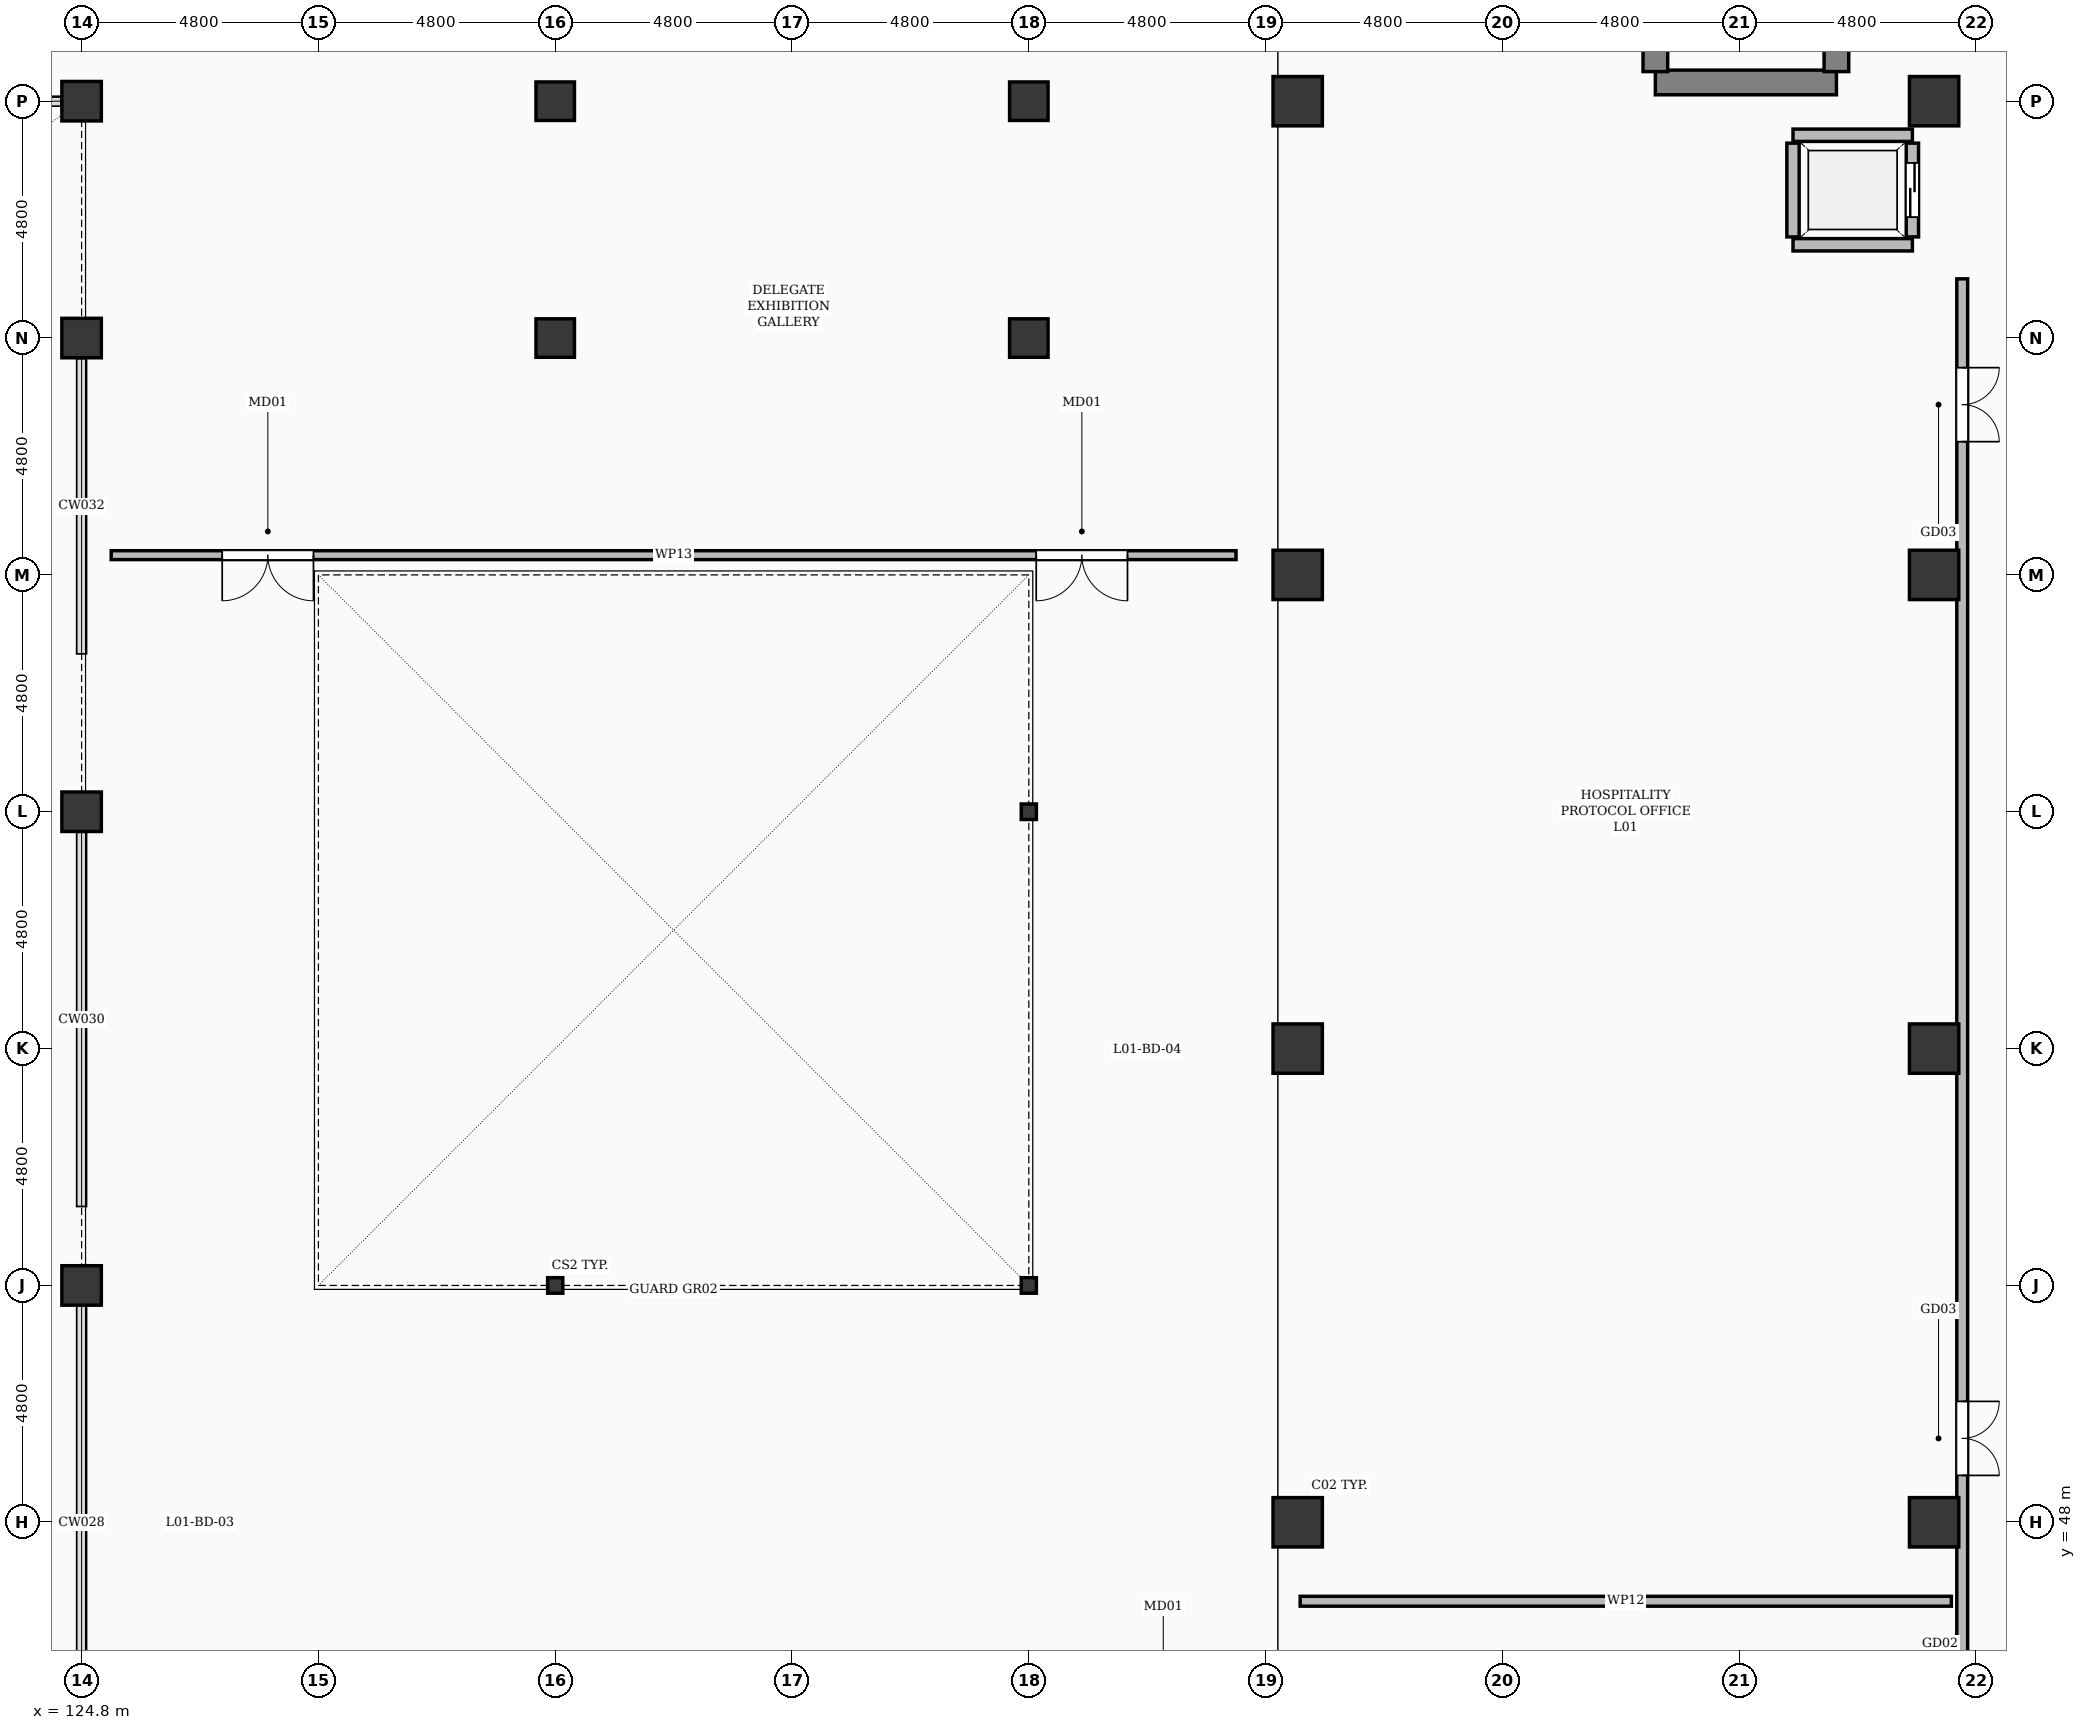
"""IFC4 building model, lengths in metres.
Left out: names, types, materials, properties, quantities, classifications, styles, units other than length and angle.
Written with IfcOpenShell. Run it as: python <this file> out.ifc"""

import sys

from ifc_helpers import new_model, si_unit, direction, frame, frame_2d, origin, origin_2d, place, context, subcontext, project, spatial, rectangle, circle, i_section, extrude, element, fill, save


model = new_model("IFC4")
c1 = context("Model", 3, precision=1e-05, world=origin(), true_north=direction((0.0, 1.0)))
c2 = subcontext(c1, "Body", "Model", "MODEL_VIEW")
j1 = project(units=[si_unit("LENGTHUNIT", "METRE"), si_unit("PLANEANGLEUNIT", "RADIAN")], contexts=[c1])
p1 = place(None, origin())
s1 = spatial("IfcSite", under=j1, at=p1, CompositionType="ELEMENT")
p2 = place(p1, origin())
s2 = spatial("IfcBuilding", under=s1, at=p2, CompositionType="ELEMENT")
p3 = place(p2, frame((0.0, 0.0, 6.0)))
s3 = spatial("IfcBuildingStorey", under=s2, at=p3, CompositionType="ELEMENT", Elevation=6.0)
for number, where, z_axis, x_axis in (
    (1, (124.8, 52.8, 0.0), (0.0, 0.0, 1.0), (1.0, 0.0, 0.0)),
    (2, (124.8, 62.4, 0.0), (0.0, 0.0, 1.0), (1.0, 0.0, 0.0)),
    (3, (124.8, 72.0, 0.0), (0.0, 0.0, 1.0), (1.0, 0.0, 0.0)),
    (4, (124.8, 76.8, 0.0), (0.0, 0.0, 1.0), (1.0, 0.0, 0.0)),
):
    element("IfcColumn", number, at=place(p3, frame(where, z_axis=z_axis, x_axis=x_axis)), inside=s3, PredefinedType="COLUMN", context=c2, shape_type="SweptSolid", body=[
        extrude(circle(Radius=0.4, at=origin_2d()), origin(), (0.0, 0.0, 1.0), 5.4),
    ])
p4 = place(p3, frame((134.4, 52.8, 0.0), z_axis=(0.0, 0.0, 1.0), x_axis=(1.0, 0.0, 0.0)))
e5 = element("IfcColumn", 5, at=p4, inside=s3, PredefinedType="COLUMN", context=c2, shape_type="SweptSolid", body=[
    extrude(i_section(OverallWidth=0.307, OverallDepth=0.314, WebThickness=0.012, FlangeThickness=0.019, FilletRadius=0.015, at=origin_2d()), origin(), (0.0, 0.0, 1.0), 5.4),
])
for number, where, z_axis, x_axis in (
    (6, (134.4, 72.0, 0.0), (0.0, 0.0, 1.0), (1.0, 0.0, 0.0)),
    (7, (134.4, 76.8, 0.0), (0.0, 0.0, 1.0), (1.0, 0.0, 0.0)),
):
    element("IfcColumn", number, at=place(p3, frame(where, z_axis=z_axis, x_axis=x_axis)), inside=s3, PredefinedType="COLUMN", context=c2, shape_type="SweptSolid", body=[
        extrude(rectangle(XDim=0.78, YDim=0.78, at=origin_2d()), origin(), (0.0, 0.0, 1.0), 5.4),
    ])
for number, where, z_axis, x_axis in (
    (8, (144.0, 52.8, 0.0), (0.0, 0.0, 1.0), (1.0, 0.0, 0.0)),
    (9, (144.0, 62.4, 0.0), (0.0, 0.0, 1.0), (1.0, 0.0, 0.0)),
):
    element("IfcColumn", number, at=place(p3, frame(where, z_axis=z_axis, x_axis=x_axis)), inside=s3, PredefinedType="COLUMN", context=c2, shape_type="SweptSolid", body=[
        extrude(i_section(OverallWidth=0.307, OverallDepth=0.314, WebThickness=0.012, FlangeThickness=0.019, FilletRadius=0.015, at=origin_2d()), origin(), (0.0, 0.0, 1.0), 5.4),
    ])
for number, where, z_axis, x_axis in (
    (10, (144.0, 72.0, 0.0), (0.0, 0.0, 1.0), (1.0, 0.0, 0.0)),
    (11, (144.0, 76.8, 0.0), (0.0, 0.0, 1.0), (1.0, 0.0, 0.0)),
):
    element("IfcColumn", number, at=place(p3, frame(where, z_axis=z_axis, x_axis=x_axis)), inside=s3, PredefinedType="COLUMN", context=c2, shape_type="SweptSolid", body=[
        extrude(rectangle(XDim=0.78, YDim=0.78, at=origin_2d()), origin(), (0.0, 0.0, 1.0), 5.4),
    ])
for number, where, z_axis, x_axis in (
    (12, (149.45, 48.0, 0.0), (0.0, 0.0, 1.0), (1.0, 0.0, 0.0)),
    (13, (149.45, 57.6, 0.0), (0.0, 0.0, 1.0), (1.0, 0.0, 0.0)),
    (14, (149.45, 67.2, 0.0), (0.0, 0.0, 1.0), (1.0, 0.0, 0.0)),
    (15, (149.45, 76.8, 0.0), (0.0, 0.0, 1.0), (1.0, 0.0, 0.0)),
    (16, (162.35, 48.0, 0.0), (0.0, 0.0, 1.0), (1.0, 0.0, 0.0)),
    (17, (162.35, 57.6, 0.0), (0.0, 0.0, 1.0), (1.0, 0.0, 0.0)),
    (18, (162.35, 67.2, 0.0), (0.0, 0.0, 1.0), (1.0, 0.0, 0.0)),
    (19, (162.35, 76.8, 0.0), (0.0, 0.0, 1.0), (1.0, 0.0, 0.0)),
):
    element("IfcColumn", number, at=place(p3, frame(where, z_axis=z_axis, x_axis=x_axis)), inside=s3, PredefinedType="COLUMN", context=c2, shape_type="SweptSolid", body=[
        extrude(rectangle(XDim=1.0, YDim=1.0, at=origin_2d()), origin(), (0.0, 0.0, 1.0), 5.4),
    ])
p5 = place(p3, frame((156.7, 77.18, 0.0), z_axis=(0.0, 0.0, 1.0), x_axis=(1.0, 0.0, 0.0)))
e20 = element("IfcWall", 20, at=p5, inside=s3, PredefinedType="SHEAR", context=c2, shape_type="SweptSolid", body=[
    extrude(rectangle(XDim=3.67, YDim=0.5, at=frame_2d((1.835, 0.0))), origin(), (0.0, 0.0, 1.0), 5.1),
])
p6 = place(p3, frame((156.7, 77.4, 0.0), z_axis=(0.0, 0.0, 1.0), x_axis=(0.0, 1.0, 0.0)))
e21 = element("IfcWall", 21, at=p6, inside=s3, PredefinedType="SHEAR", context=c2, shape_type="SweptSolid", body=[
    extrude(rectangle(XDim=10.5, YDim=0.5, at=frame_2d((5.25, 0.0))), origin(), (0.0, 0.0, 1.0), 5.1),
])
p7 = place(p3, frame((160.37, 77.4, 0.0), z_axis=(0.0, 0.0, 1.0), x_axis=(0.0, 1.0, 0.0)))
e22 = element("IfcWall", 22, at=p7, inside=s3, PredefinedType="SHEAR", context=c2, shape_type="SweptSolid", body=[
    extrude(rectangle(XDim=10.5, YDim=0.5, at=frame_2d((5.25, 0.0))), origin(), (0.0, 0.0, 1.0), 5.1),
])
p8 = place(p7, frame((0.45, 0.0, 0.0)))
e23 = element("IfcOpeningElement", 23, at=p8, cuts=e22, PredefinedType="OPENING", context=c2, shape_type="SweptSolid", body=[
    extrude(rectangle(XDim=1.3, YDim=2.15, at=frame_2d((0.65, 1.075))), frame((0.0, 0.262, 0.0), z_axis=(0.0, -1.0, 0.0), x_axis=(1.0, 0.0, 0.0)), (0.0, 0.0, 1.0), 0.524),
])
for number, where, z_axis, x_axis in (
    (24, (159.49, 73.89, 0.0), (0.0, 0.0, 1.0), (1.0, 0.0, 0.0)),
    (25, (159.49, 76.11, 0.0), (0.0, 0.0, 1.0), (1.0, 0.0, 0.0)),
):
    element("IfcWall", number, at=place(p3, frame(where, z_axis=z_axis, x_axis=x_axis)), inside=s3, PredefinedType="SOLIDWALL", context=c2, shape_type="SweptSolid", body=[
        extrude(rectangle(XDim=2.42, YDim=0.25, at=frame_2d((1.21, 0.0))), origin(), (0.0, 0.0, 1.0), 5.1),
    ])
p9 = place(p3, frame((159.49, 74.05, 0.0), z_axis=(0.0, 0.0, 1.0), x_axis=(0.0, 1.0, 0.0)))
e26 = element("IfcWall", 26, at=p9, inside=s3, PredefinedType="SOLIDWALL", context=c2, shape_type="SweptSolid", body=[
    extrude(rectangle(XDim=1.9, YDim=0.25, at=frame_2d((0.95, 0.0))), origin(), (0.0, 0.0, 1.0), 5.1),
])
p10 = place(p3, frame((161.91, 74.05, 0.0), z_axis=(0.0, 0.0, 1.0), x_axis=(0.0, 1.0, 0.0)))
e27 = element("IfcWall", 27, at=p10, inside=s3, PredefinedType="SOLIDWALL", context=c2, shape_type="SweptSolid", body=[
    extrude(rectangle(XDim=1.9, YDim=0.25, at=frame_2d((0.95, 0.0))), origin(), (0.0, 0.0, 1.0), 5.1),
])
p11 = place(p10, frame((0.4, 0.0, 0.0)))
e28 = element("IfcOpeningElement", 28, at=p11, cuts=e27, PredefinedType="OPENING", context=c2, shape_type="SweptSolid", body=[
    extrude(rectangle(XDim=1.1, YDim=2.2, at=frame_2d((0.55, 1.1))), frame((0.0, 0.137, 0.0), z_axis=(0.0, -1.0, 0.0), x_axis=(1.0, 0.0, 0.0)), (0.0, 0.0, 1.0), 0.274),
])
p12 = place(p3, frame((162.92, 0.35, 0.0), z_axis=(0.0, 0.0, 1.0), x_axis=(0.0, 1.0, 0.0)))
e29 = element("IfcWall", 29, at=p12, inside=s3, PredefinedType="PARTITIONING", context=c2, shape_type="SweptSolid", body=[
    extrude(rectangle(XDim=72.85, YDim=0.22, at=frame_2d((36.425, 0.0))), origin(), (0.0, 0.0, 1.0), 4.312),
])
p13 = place(p12, frame((1.95, 0.0, 0.0)))
e30 = element("IfcOpeningElement", 30, at=p13, cuts=e29, PredefinedType="OPENING", context=c2, shape_type="SweptSolid", body=[
    extrude(rectangle(XDim=1.08, YDim=2.25, at=frame_2d((0.54, 1.125))), frame((0.0, 0.122, 0.0), z_axis=(0.0, -1.0, 0.0), x_axis=(1.0, 0.0, 0.0)), (0.0, 0.0, 1.0), 0.244),
])
p14 = place(p12, frame((42.75, 0.0, 0.0)))
e31 = element("IfcOpeningElement", 31, at=p14, cuts=e29, PredefinedType="OPENING", context=c2, shape_type="SweptSolid", body=[
    extrude(rectangle(XDim=1.08, YDim=2.25, at=frame_2d((0.54, 1.125))), frame((0.0, 0.122, 0.0), z_axis=(0.0, -1.0, 0.0), x_axis=(1.0, 0.0, 0.0)), (0.0, 0.0, 1.0), 0.244),
])
p15 = place(p12, frame((48.6, 0.0, 0.0)))
e32 = element("IfcOpeningElement", 32, at=p15, cuts=e29, PredefinedType="OPENING", context=c2, shape_type="SweptSolid", body=[
    extrude(rectangle(XDim=1.5, YDim=2.3, at=frame_2d((0.75, 1.15))), frame((0.0, 0.122, 0.0), z_axis=(0.0, -1.0, 0.0), x_axis=(1.0, 0.0, 0.0)), (0.0, 0.0, 1.0), 0.244),
])
p16 = place(p12, frame((69.55, 0.0, 0.0)))
e33 = element("IfcOpeningElement", 33, at=p16, cuts=e29, PredefinedType="OPENING", context=c2, shape_type="SweptSolid", body=[
    extrude(rectangle(XDim=1.5, YDim=2.3, at=frame_2d((0.75, 1.15))), frame((0.0, 0.122, 0.0), z_axis=(0.0, -1.0, 0.0), x_axis=(1.0, 0.0, 0.0)), (0.0, 0.0, 1.0), 0.244),
])
p17 = place(p3, frame((125.4, 67.6, 0.0), z_axis=(0.0, 0.0, 1.0), x_axis=(1.0, 0.0, 0.0)))
e34 = element("IfcWall", 34, at=p17, inside=s3, PredefinedType="PARTITIONING", context=c2, shape_type="SweptSolid", body=[
    extrude(rectangle(XDim=22.8, YDim=0.18, at=frame_2d((11.4, 0.0))), origin(), (0.0, 0.0, 1.0), 4.312),
])
p18 = place(p17, frame((2.25, 0.0, 0.0)))
e35 = element("IfcOpeningElement", 35, at=p18, cuts=e34, PredefinedType="OPENING", context=c2, shape_type="SweptSolid", body=[
    extrude(rectangle(XDim=1.85, YDim=2.35, at=frame_2d((0.925, 1.175))), frame((0.0, 0.102, 0.0), z_axis=(0.0, -1.0, 0.0), x_axis=(1.0, 0.0, 0.0)), (0.0, 0.0, 1.0), 0.204),
])
p19 = place(p17, frame((18.75, 0.0, 0.0)))
e36 = element("IfcOpeningElement", 36, at=p19, cuts=e34, PredefinedType="OPENING", context=c2, shape_type="SweptSolid", body=[
    extrude(rectangle(XDim=1.85, YDim=2.35, at=frame_2d((0.925, 1.175))), frame((0.0, 0.102, 0.0), z_axis=(0.0, -1.0, 0.0), x_axis=(1.0, 0.0, 0.0)), (0.0, 0.0, 1.0), 0.204),
])
p20 = place(p3, frame((149.5, 46.4, 0.0), z_axis=(0.0, 0.0, 1.0), x_axis=(1.0, 0.0, 0.0)))
e37 = element("IfcWall", 37, at=p20, inside=s3, PredefinedType="PARTITIONING", context=c2, shape_type="SweptSolid", body=[
    extrude(rectangle(XDim=13.2, YDim=0.2, at=frame_2d((6.6, 0.0))), origin(), (0.0, 0.0, 1.0), 4.312),
])
p21 = place(p11, origin())
e38 = element("IfcDoor", 38, at=p21, inside=s3, OperationType="SLIDING_TO_LEFT", PredefinedType="DOOR", context=c2, shape_type="SweptSolid", body=[
    extrude(rectangle(XDim=1.1, YDim=2.2, at=frame_2d((0.55, 1.1))), frame((0.0, 0.025, 0.0), z_axis=(0.0, -1.0, 0.0), x_axis=(1.0, 0.0, 0.0)), (0.0, 0.0, 1.0), 0.05),
])
fill(e28, e38)
p22 = place(p18, frame((1.85, 0.0, 0.0), z_axis=(0.0, 0.0, 1.0), x_axis=(-1.0, 0.0, 0.0)))
e39 = element("IfcDoor", 39, at=p22, inside=s3, OperationType="DOUBLE_DOOR_SINGLE_SWING", PredefinedType="DOOR", context=c2, shape_type="SweptSolid", body=[
    extrude(rectangle(XDim=1.85, YDim=2.35, at=frame_2d((0.925, 1.175))), frame((0.0, 0.025, 0.0), z_axis=(0.0, -1.0, 0.0), x_axis=(1.0, 0.0, 0.0)), (0.0, 0.0, 1.0), 0.05),
])
fill(e35, e39)
p23 = place(p19, frame((1.85, 0.0, 0.0), z_axis=(0.0, 0.0, 1.0), x_axis=(-1.0, 0.0, 0.0)))
e40 = element("IfcDoor", 40, at=p23, inside=s3, OperationType="DOUBLE_DOOR_SINGLE_SWING", PredefinedType="DOOR", context=c2, shape_type="SweptSolid", body=[
    extrude(rectangle(XDim=1.85, YDim=2.35, at=frame_2d((0.925, 1.175))), frame((0.0, 0.025, 0.0), z_axis=(0.0, -1.0, 0.0), x_axis=(1.0, 0.0, 0.0)), (0.0, 0.0, 1.0), 0.05),
])
fill(e36, e40)
p24 = place(p15, frame((1.5, 0.0, 0.0), z_axis=(0.0, 0.0, 1.0), x_axis=(-1.0, 0.0, 0.0)))
e41 = element("IfcDoor", 41, at=p24, inside=s3, OperationType="DOUBLE_DOOR_SINGLE_SWING", PredefinedType="DOOR", context=c2, shape_type="SweptSolid", body=[
    extrude(rectangle(XDim=1.5, YDim=2.3, at=frame_2d((0.75, 1.15))), frame((0.0, 0.025, 0.0), z_axis=(0.0, -1.0, 0.0), x_axis=(1.0, 0.0, 0.0)), (0.0, 0.0, 1.0), 0.05),
])
fill(e32, e41)
p25 = place(p16, frame((1.5, 0.0, 0.0), z_axis=(0.0, 0.0, 1.0), x_axis=(-1.0, 0.0, 0.0)))
e42 = element("IfcDoor", 42, at=p25, inside=s3, OperationType="DOUBLE_DOOR_SINGLE_SWING", PredefinedType="DOOR", context=c2, shape_type="SweptSolid", body=[
    extrude(rectangle(XDim=1.5, YDim=2.3, at=frame_2d((0.75, 1.15))), frame((0.0, 0.025, 0.0), z_axis=(0.0, -1.0, 0.0), x_axis=(1.0, 0.0, 0.0)), (0.0, 0.0, 1.0), 0.05),
])
fill(e33, e42)
save(model, sys.argv[1])
